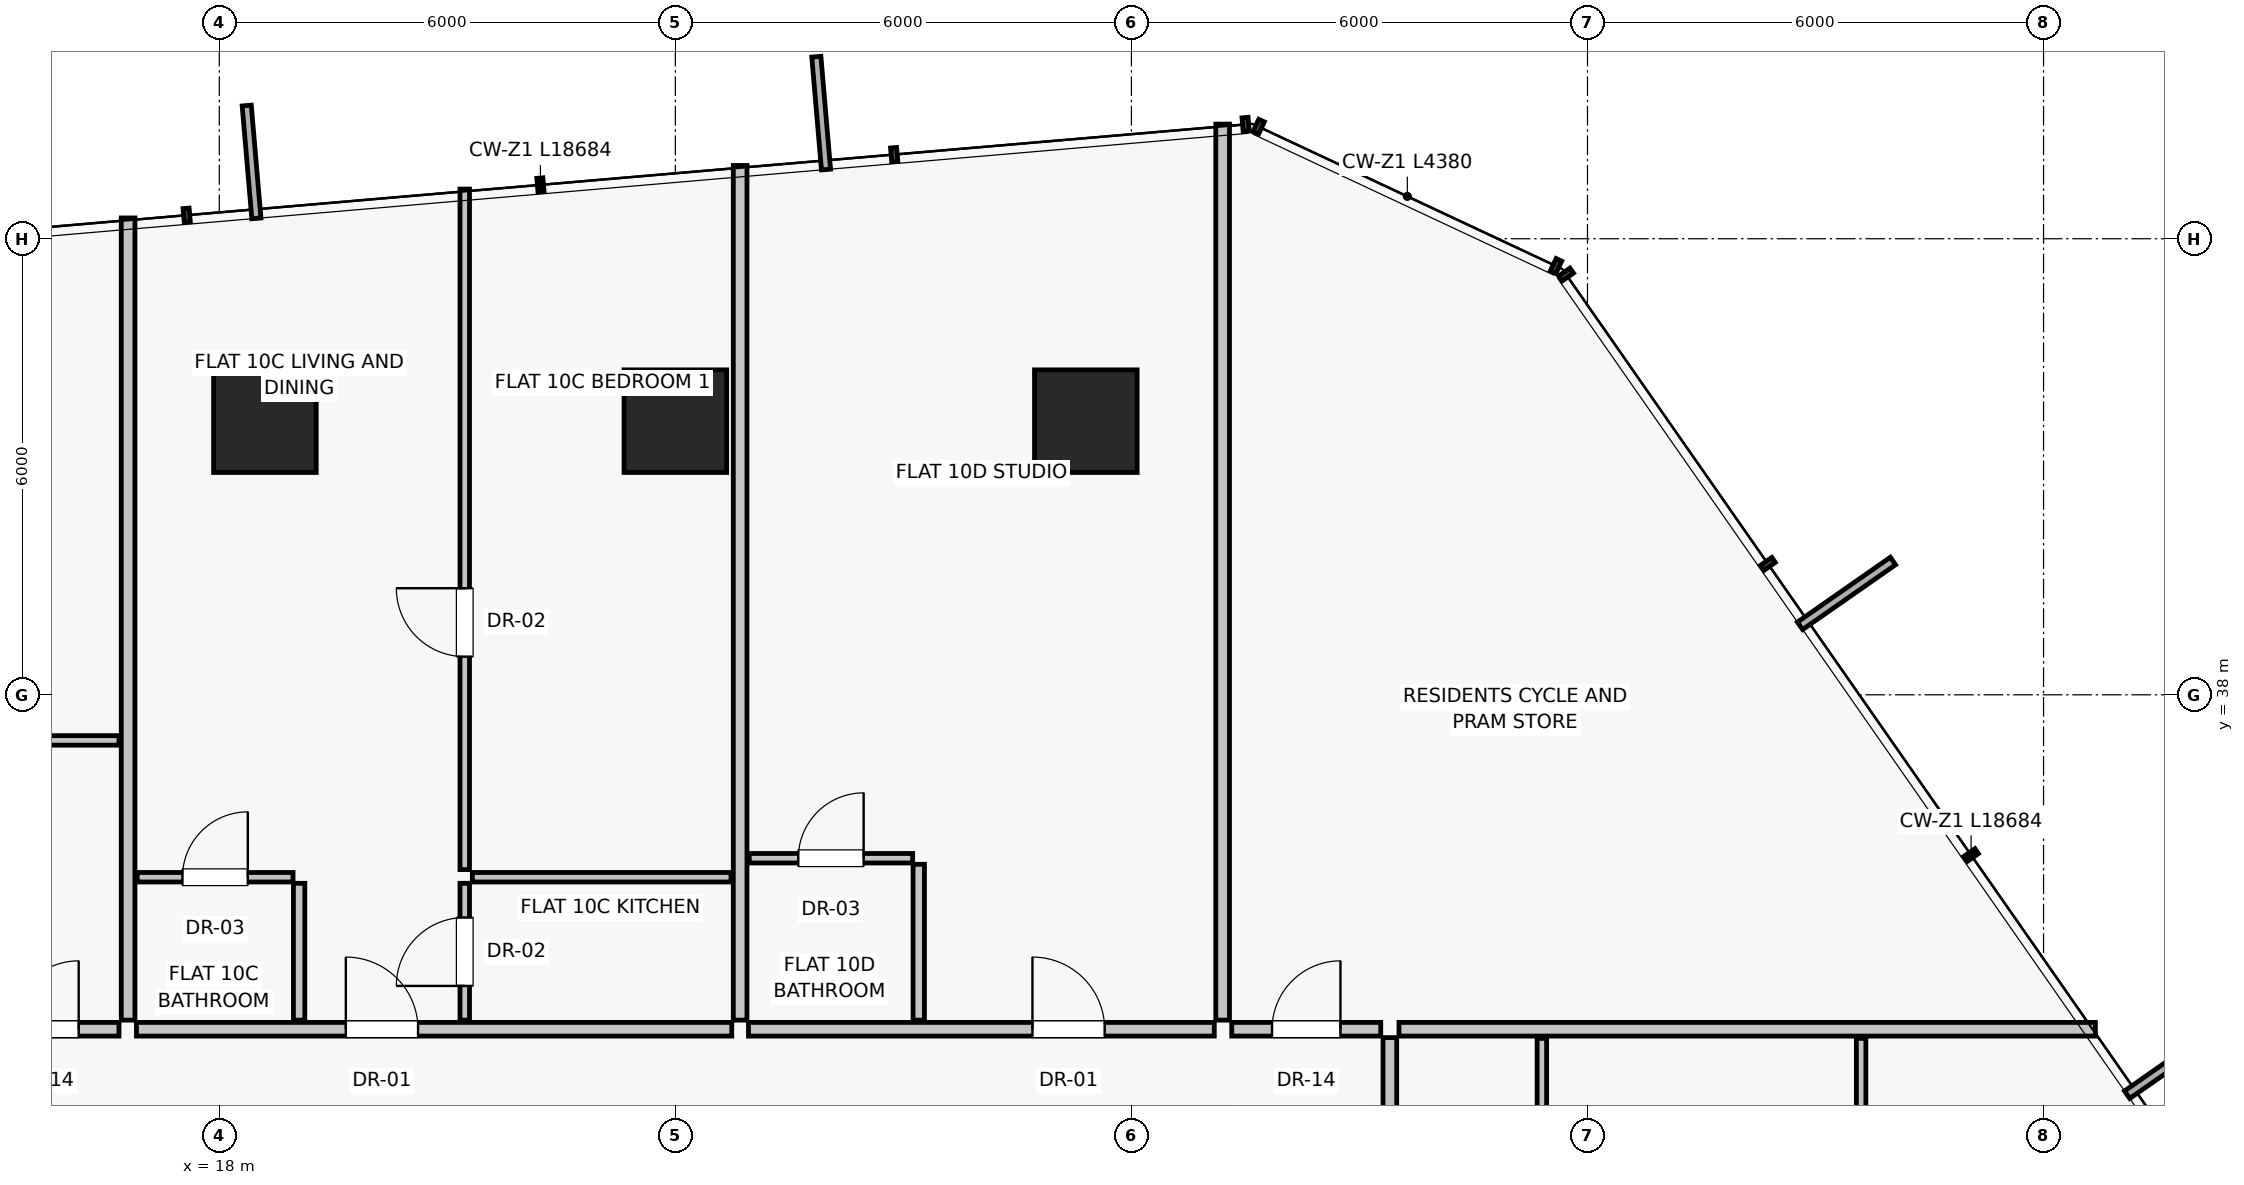
"""IFC4 building model, lengths in metres.
Left out: names, types, materials, properties, quantities, classifications, styles, units other than length and angle.
Written with IfcOpenShell. Run it as: python <this file> out.ifc"""

import sys

from ifc_helpers import new_model, si_unit, direction, frame, frame_2d, origin, origin_2d, place, context, subcontext, project, spatial, rectangle, extrude, source, transform, mapped, element, fill, save


model = new_model("IFC4")
c1 = context("Model", 3, precision=1e-05, world=origin(), true_north=direction((0.0, 1.0)))
c2 = subcontext(c1, "Body", "Model", "MODEL_VIEW")
j1 = project(units=[si_unit("LENGTHUNIT", "METRE"), si_unit("PLANEANGLEUNIT", "RADIAN")], contexts=[c1])
p1 = place(None, origin())
s1 = spatial("IfcSite", under=j1, at=p1, CompositionType="ELEMENT")
p2 = place(p1, origin())
s2 = spatial("IfcBuilding", under=s1, at=p2, CompositionType="ELEMENT")
p3 = place(p2, frame((0.0, 0.0, 40.3)))
s3 = spatial("IfcBuildingStorey", under=s2, at=p3, CompositionType="ELEMENT", Elevation=40.3)
for number, where, z_axis, x_axis in (
    (1, (29.4, 41.6, 0.0), (0.0, 0.0, 1.0), (1.0, 0.0, 0.0)),
    (2, (24.0, 41.6, 0.0), (0.0, 0.0, 1.0), (1.0, 0.0, 0.0)),
    (3, (18.6, 41.6, 0.0), (0.0, 0.0, 1.0), (1.0, 0.0, 0.0)),
):
    element("IfcColumn", number, at=place(p3, frame(where, z_axis=z_axis, x_axis=x_axis)), inside=s3, PredefinedType="COLUMN", context=c2, shape_type="SweptSolid", body=[
        extrude(rectangle(XDim=1.35, YDim=1.35, at=origin_2d()), origin(), (0.0, 0.0, 1.0), 3.25),
    ])
p4 = place(p3, frame((16.8, 33.72, 0.0), z_axis=(0.0, 0.0, 1.0), x_axis=(0.0, 1.0, 0.0)))
e4 = element("IfcWall", 4, at=p4, inside=s3, PredefinedType="PARTITIONING", context=c2, shape_type="SweptSolid", body=[
    extrude(rectangle(XDim=10.554, YDim=0.18, at=frame_2d((5.277, 0.0))), origin(), (0.0, 0.0, 1.0), 3.0),
])
p5 = place(p3, frame((31.2, 33.72, 0.0), z_axis=(0.0, 0.0, 1.0), x_axis=(0.0, 1.0, 0.0)))
e5 = element("IfcWall", 5, at=p5, inside=s3, PredefinedType="PARTITIONING", context=c2, shape_type="SweptSolid", body=[
    extrude(rectangle(XDim=11.788, YDim=0.18, at=frame_2d((5.894, 0.0))), origin(), (0.0, 0.0, 1.0), 3.0),
])
p6 = place(p3, frame((16.91, 33.6, 0.0), z_axis=(0.0, 0.0, 1.0), x_axis=(1.0, 0.0, 0.0)))
e6 = element("IfcWall", 6, at=p6, inside=s3, PredefinedType="PARTITIONING", context=c2, shape_type="SweptSolid", body=[
    extrude(rectangle(XDim=7.832, YDim=0.18, at=frame_2d((3.916, 0.0))), origin(), (0.0, 0.0, 1.0), 3.0),
])
p7 = place(p6, frame((2.754, 0.0, 0.0)))
e7 = element("IfcOpeningElement", 7, at=p7, cuts=e6, PredefinedType="OPENING", context=c2, shape_type="SweptSolid", body=[
    extrude(rectangle(XDim=0.95, YDim=2.02, at=frame_2d((0.475, 1.01))), frame((0.0, 0.1, 0.0), z_axis=(0.0, -1.0, 0.0), x_axis=(1.0, 0.0, 0.0)), (0.0, 0.0, 1.0), 0.2),
])
p8 = place(p3, frame((19.05, 33.72, 0.0), z_axis=(0.0, 0.0, 1.0), x_axis=(0.0, 1.0, 0.0)))
e8 = element("IfcWall", 8, at=p8, inside=s3, PredefinedType="PARTITIONING", context=c2, shape_type="SweptSolid", body=[
    extrude(rectangle(XDim=1.8, YDim=0.15, at=frame_2d((0.9, 0.0))), origin(), (0.0, 0.0, 1.0), 3.0),
])
p9 = place(p3, frame((16.92, 35.6, 0.0), z_axis=(0.0, 0.0, 1.0), x_axis=(1.0, 0.0, 0.0)))
e9 = element("IfcWall", 9, at=p9, inside=s3, PredefinedType="PARTITIONING", context=c2, shape_type="SweptSolid", body=[
    extrude(rectangle(XDim=2.05, YDim=0.125, at=frame_2d((1.025, 0.0))), origin(), (0.0, 0.0, 1.0), 3.0),
])
p10 = place(p9, frame((0.595, 0.0, 0.0)))
e10 = element("IfcOpeningElement", 10, at=p10, cuts=e9, PredefinedType="OPENING", context=c2, shape_type="SweptSolid", body=[
    extrude(rectangle(XDim=0.86, YDim=2.01, at=frame_2d((0.43, 1.005))), frame((0.0, 0.073, 0.0), z_axis=(0.0, -1.0, 0.0), x_axis=(1.0, 0.0, 0.0)), (0.0, 0.0, 1.0), 0.145),
])
p11 = place(p3, frame((21.229, 33.72, 0.0), z_axis=(0.0, 0.0, 1.0), x_axis=(0.0, 1.0, 0.0)))
e11 = element("IfcWall", 11, at=p11, inside=s3, PredefinedType="PARTITIONING", context=c2, shape_type="SweptSolid", body=[
    extrude(rectangle(XDim=1.8, YDim=0.125, at=frame_2d((0.9, 0.0))), origin(), (0.0, 0.0, 1.0), 3.0),
])
p12 = place(p11, frame((0.45, 0.0, 0.0)))
e12 = element("IfcOpeningElement", 12, at=p12, cuts=e11, PredefinedType="OPENING", context=c2, shape_type="SweptSolid", body=[
    extrude(rectangle(XDim=0.9, YDim=2.01, at=frame_2d((0.45, 1.005))), frame((0.0, 0.073, 0.0), z_axis=(0.0, -1.0, 0.0), x_axis=(1.0, 0.0, 0.0)), (0.0, 0.0, 1.0), 0.145),
])
p13 = place(p3, frame((21.329, 35.6, 0.0), z_axis=(0.0, 0.0, 1.0), x_axis=(1.0, 0.0, 0.0)))
e13 = element("IfcWall", 13, at=p13, inside=s3, PredefinedType="PARTITIONING", context=c2, shape_type="SweptSolid", body=[
    extrude(rectangle(XDim=3.403, YDim=0.125, at=frame_2d((1.701, 0.0))), origin(), (0.0, 0.0, 1.0), 3.0),
])
p14 = place(p3, frame((21.229, 35.7, 0.0), z_axis=(0.0, 0.0, 1.0), x_axis=(0.0, 1.0, 0.0)))
e14 = element("IfcWall", 14, at=p14, inside=s3, PredefinedType="PARTITIONING", context=c2, shape_type="SweptSolid", body=[
    extrude(rectangle(XDim=8.953, YDim=0.125, at=frame_2d((4.477, 0.0))), origin(), (0.0, 0.0, 1.0), 3.0),
])
p15 = place(p14, frame((2.802, 0.0, 0.0)))
e15 = element("IfcOpeningElement", 15, at=p15, cuts=e14, PredefinedType="OPENING", context=c2, shape_type="SweptSolid", body=[
    extrude(rectangle(XDim=0.9, YDim=2.01, at=frame_2d((0.45, 1.005))), frame((0.0, 0.073, 0.0), z_axis=(0.0, -1.0, 0.0), x_axis=(1.0, 0.0, 0.0)), (0.0, 0.0, 1.0), 0.145),
])
p16 = place(p3, frame((24.852, 33.72, 0.0), z_axis=(0.0, 0.0, 1.0), x_axis=(0.0, 1.0, 0.0)))
e16 = element("IfcWall", 16, at=p16, inside=s3, PredefinedType="PARTITIONING", context=c2, shape_type="SweptSolid", body=[
    extrude(rectangle(XDim=11.244, YDim=0.18, at=frame_2d((5.622, 0.0))), origin(), (0.0, 0.0, 1.0), 3.0),
])
p17 = place(p3, frame((24.962, 33.6, 0.0), z_axis=(0.0, 0.0, 1.0), x_axis=(1.0, 0.0, 0.0)))
e17 = element("IfcWall", 17, at=p17, inside=s3, PredefinedType="PARTITIONING", context=c2, shape_type="SweptSolid", body=[
    extrude(rectangle(XDim=6.128, YDim=0.18, at=frame_2d((3.064, 0.0))), origin(), (0.0, 0.0, 1.0), 3.0),
])
p18 = place(p17, frame((3.736, 0.0, 0.0)))
e18 = element("IfcOpeningElement", 18, at=p18, cuts=e17, PredefinedType="OPENING", context=c2, shape_type="SweptSolid", body=[
    extrude(rectangle(XDim=0.95, YDim=2.02, at=frame_2d((0.475, 1.01))), frame((0.0, 0.1, 0.0), z_axis=(0.0, -1.0, 0.0), x_axis=(1.0, 0.0, 0.0)), (0.0, 0.0, 1.0), 0.2),
])
p19 = place(p3, frame((27.202, 33.72, 0.0), z_axis=(0.0, 0.0, 1.0), x_axis=(0.0, 1.0, 0.0)))
e19 = element("IfcWall", 19, at=p19, inside=s3, PredefinedType="PARTITIONING", context=c2, shape_type="SweptSolid", body=[
    extrude(rectangle(XDim=2.05, YDim=0.15, at=frame_2d((1.025, 0.0))), origin(), (0.0, 0.0, 1.0), 3.0),
])
p20 = place(p3, frame((24.972, 35.85, 0.0), z_axis=(0.0, 0.0, 1.0), x_axis=(1.0, 0.0, 0.0)))
e20 = element("IfcWall", 20, at=p20, inside=s3, PredefinedType="PARTITIONING", context=c2, shape_type="SweptSolid", body=[
    extrude(rectangle(XDim=2.15, YDim=0.125, at=frame_2d((1.075, 0.0))), origin(), (0.0, 0.0, 1.0), 3.0),
])
p21 = place(p20, frame((0.645, 0.0, 0.0)))
e21 = element("IfcOpeningElement", 21, at=p21, cuts=e20, PredefinedType="OPENING", context=c2, shape_type="SweptSolid", body=[
    extrude(rectangle(XDim=0.86, YDim=2.01, at=frame_2d((0.43, 1.005))), frame((0.0, 0.073, 0.0), z_axis=(0.0, -1.0, 0.0), x_axis=(1.0, 0.0, 0.0)), (0.0, 0.0, 1.0), 0.145),
])
p22 = place(p3, frame((33.52, 33.6, 0.0), z_axis=(0.0, 0.0, 1.0), x_axis=(1.0, 0.0, 0.0)))
e22 = element("IfcWall", 22, at=p22, inside=s3, PredefinedType="PARTITIONING", context=c2, shape_type="SweptSolid", body=[
    extrude(rectangle(XDim=9.162, YDim=0.18, at=frame_2d((4.581, 0.0))), origin(), (0.0, 0.0, 1.0), 3.0),
])
p23 = place(p3, frame((33.4, 24.618, 0.0), z_axis=(0.0, 0.0, 1.0), x_axis=(0.0, 1.0, 0.0)))
e23 = element("IfcWall", 23, at=p23, inside=s3, PredefinedType="PARTITIONING", context=c2, shape_type="SweptSolid", body=[
    extrude(rectangle(XDim=8.872, YDim=0.18, at=frame_2d((4.436, 0.0))), origin(), (0.0, 0.0, 1.0), 3.0),
])
p24 = place(p23, frame((2.995, 0.0, 0.0)))
e24 = element("IfcOpeningElement", 24, at=p24, cuts=e23, PredefinedType="OPENING", context=c2, shape_type="SweptSolid", body=[
    extrude(rectangle(XDim=0.95, YDim=2.02, at=frame_2d((0.475, 1.01))), frame((0.0, 0.1, 0.0), z_axis=(0.0, -1.0, 0.0), x_axis=(1.0, 0.0, 0.0)), (0.0, 0.0, 1.0), 0.2),
])
for number, where, z_axis, x_axis in (
    (25, (35.4, 29.518, 0.0), (0.0, 0.0, 1.0), (0.0, 1.0, 0.0)),
    (26, (39.6, 29.518, 0.0), (0.0, 0.0, 1.0), (0.0, 1.0, 0.0)),
):
    element("IfcWall", number, at=place(p3, frame(where, z_axis=z_axis, x_axis=x_axis)), inside=s3, PredefinedType="PARTITIONING", context=c2, shape_type="SweptSolid", body=[
        extrude(rectangle(XDim=3.962, YDim=0.125, at=frame_2d((1.981, 0.0))), origin(), (0.0, 0.0, 1.0), 3.0),
    ])
p25 = place(p3, frame((14.72, 33.6, 0.0), z_axis=(0.0, 0.0, 1.0), x_axis=(1.0, 0.0, 0.0)))
e27 = element("IfcWall", 27, at=p25, inside=s3, PredefinedType="PARTITIONING", context=c2, shape_type="SweptSolid", body=[
    extrude(rectangle(XDim=1.96, YDim=0.18, at=frame_2d((0.98, 0.0))), origin(), (0.0, 0.0, 1.0), 3.0),
])
p26 = place(p25, frame((0.53, 0.0, 0.0)))
e28 = element("IfcOpeningElement", 28, at=p26, cuts=e27, PredefinedType="OPENING", context=c2, shape_type="SweptSolid", body=[
    extrude(rectangle(XDim=0.9, YDim=2.01, at=frame_2d((0.45, 1.005))), frame((0.0, 0.1, 0.0), z_axis=(0.0, -1.0, 0.0), x_axis=(1.0, 0.0, 0.0)), (0.0, 0.0, 1.0), 0.2),
])
p27 = place(p3, frame((7.292, 37.4, 0.0), z_axis=(0.0, 0.0, 1.0), x_axis=(1.0, 0.0, 0.0)))
e29 = element("IfcWall", 29, at=p27, inside=s3, PredefinedType="PARTITIONING", context=c2, shape_type="SweptSolid", body=[
    extrude(rectangle(XDim=9.388, YDim=0.125, at=frame_2d((4.694, 0.0))), origin(), (0.0, 0.0, 1.0), 3.0),
])
p28 = place(p27, frame((4.264, 0.0, 0.0)))
e30 = element("IfcOpeningElement", 30, at=p28, cuts=e29, PredefinedType="OPENING", context=c2, shape_type="SweptSolid", body=[
    extrude(rectangle(XDim=0.86, YDim=2.01, at=frame_2d((0.43, 1.005))), frame((0.0, 0.073, 0.0), z_axis=(0.0, -1.0, 0.0), x_axis=(1.0, 0.0, 0.0)), (0.0, 0.0, 1.0), 0.145),
])
p29 = place(p3, frame((31.32, 33.6, 0.0), z_axis=(0.0, 0.0, 1.0), x_axis=(1.0, 0.0, 0.0)))
e31 = element("IfcWall", 31, at=p29, inside=s3, PredefinedType="PARTITIONING", context=c2, shape_type="SweptSolid", body=[
    extrude(rectangle(XDim=1.96, YDim=0.18, at=frame_2d((0.98, 0.0))), origin(), (0.0, 0.0, 1.0), 3.0),
])
p30 = place(p29, frame((0.53, 0.0, 0.0)))
e32 = element("IfcOpeningElement", 32, at=p30, cuts=e31, PredefinedType="OPENING", context=c2, shape_type="SweptSolid", body=[
    extrude(rectangle(XDim=0.9, YDim=2.01, at=frame_2d((0.45, 1.005))), frame((0.0, 0.1, 0.0), z_axis=(0.0, -1.0, 0.0), x_axis=(1.0, 0.0, 0.0)), (0.0, 0.0, 1.0), 0.2),
])
m1 = source(origin(), c2, "Body", "SweptSolid", [
    extrude(rectangle(XDim=0.95, YDim=2.02, at=frame_2d((0.475, 1.01))), frame((0.0, 0.025, 0.0), z_axis=(0.0, -1.0, 0.0), x_axis=(1.0, 0.0, 0.0)), (0.0, 0.0, 1.0), 0.05),
])
p31 = place(p7, origin())
e33 = element("IfcDoor", 33, at=p31, inside=s3, OperationType="SINGLE_SWING_LEFT", PredefinedType="DOOR", context=c2, shape_type="MappedRepresentation", body=[
    mapped(m1, transform((0.0, 0.0, 0.0), scale=1.0)),
])
fill(e7, e33)
m2 = source(origin(), c2, "Body", "SweptSolid", [
    extrude(rectangle(XDim=0.86, YDim=2.01, at=frame_2d((0.43, 1.005))), frame((0.0, 0.025, 0.0), z_axis=(0.0, -1.0, 0.0), x_axis=(1.0, 0.0, 0.0)), (0.0, 0.0, 1.0), 0.05),
])
p32 = place(p10, origin())
e34 = element("IfcDoor", 34, at=p32, inside=s3, OperationType="SINGLE_SWING_RIGHT", PredefinedType="DOOR", context=c2, shape_type="MappedRepresentation", body=[
    mapped(m2, transform((0.0, 0.0, 0.0), scale=1.0)),
])
fill(e10, e34)
m3 = source(origin(), c2, "Body", "SweptSolid", [
    extrude(rectangle(XDim=0.9, YDim=2.01, at=frame_2d((0.45, 1.005))), frame((0.0, 0.025, 0.0), z_axis=(0.0, -1.0, 0.0), x_axis=(1.0, 0.0, 0.0)), (0.0, 0.0, 1.0), 0.05),
])
p33 = place(p12, origin())
e35 = element("IfcDoor", 35, at=p33, inside=s3, OperationType="SINGLE_SWING_LEFT", PredefinedType="DOOR", context=c2, shape_type="MappedRepresentation", body=[
    mapped(m3, transform((0.0, 0.0, 0.0), scale=1.0)),
])
fill(e12, e35)
p34 = place(p15, origin())
e36 = element("IfcDoor", 36, at=p34, inside=s3, OperationType="SINGLE_SWING_RIGHT", PredefinedType="DOOR", context=c2, shape_type="MappedRepresentation", body=[
    mapped(m3, transform((0.0, 0.0, 0.0), scale=1.0)),
])
fill(e15, e36)
p35 = place(p18, origin())
e37 = element("IfcDoor", 37, at=p35, inside=s3, OperationType="SINGLE_SWING_LEFT", PredefinedType="DOOR", context=c2, shape_type="MappedRepresentation", body=[
    mapped(m1, transform((0.0, 0.0, 0.0), scale=1.0)),
])
fill(e18, e37)
p36 = place(p21, origin())
e38 = element("IfcDoor", 38, at=p36, inside=s3, OperationType="SINGLE_SWING_RIGHT", PredefinedType="DOOR", context=c2, shape_type="MappedRepresentation", body=[
    mapped(m2, transform((0.0, 0.0, 0.0), scale=1.0)),
])
fill(e21, e38)
p37 = place(p26, origin())
e39 = element("IfcDoor", 39, at=p37, inside=s3, OperationType="SINGLE_SWING_RIGHT", PredefinedType="DOOR", context=c2, shape_type="MappedRepresentation", body=[
    mapped(m3, transform((0.0, 0.0, 0.0), scale=1.0)),
])
fill(e28, e39)
p38 = place(p30, origin())
e40 = element("IfcDoor", 40, at=p38, inside=s3, OperationType="SINGLE_SWING_RIGHT", PredefinedType="DOOR", context=c2, shape_type="MappedRepresentation", body=[
    mapped(m3, transform((0.0, 0.0, 0.0), scale=1.0)),
])
fill(e32, e40)
save(model, sys.argv[1])
